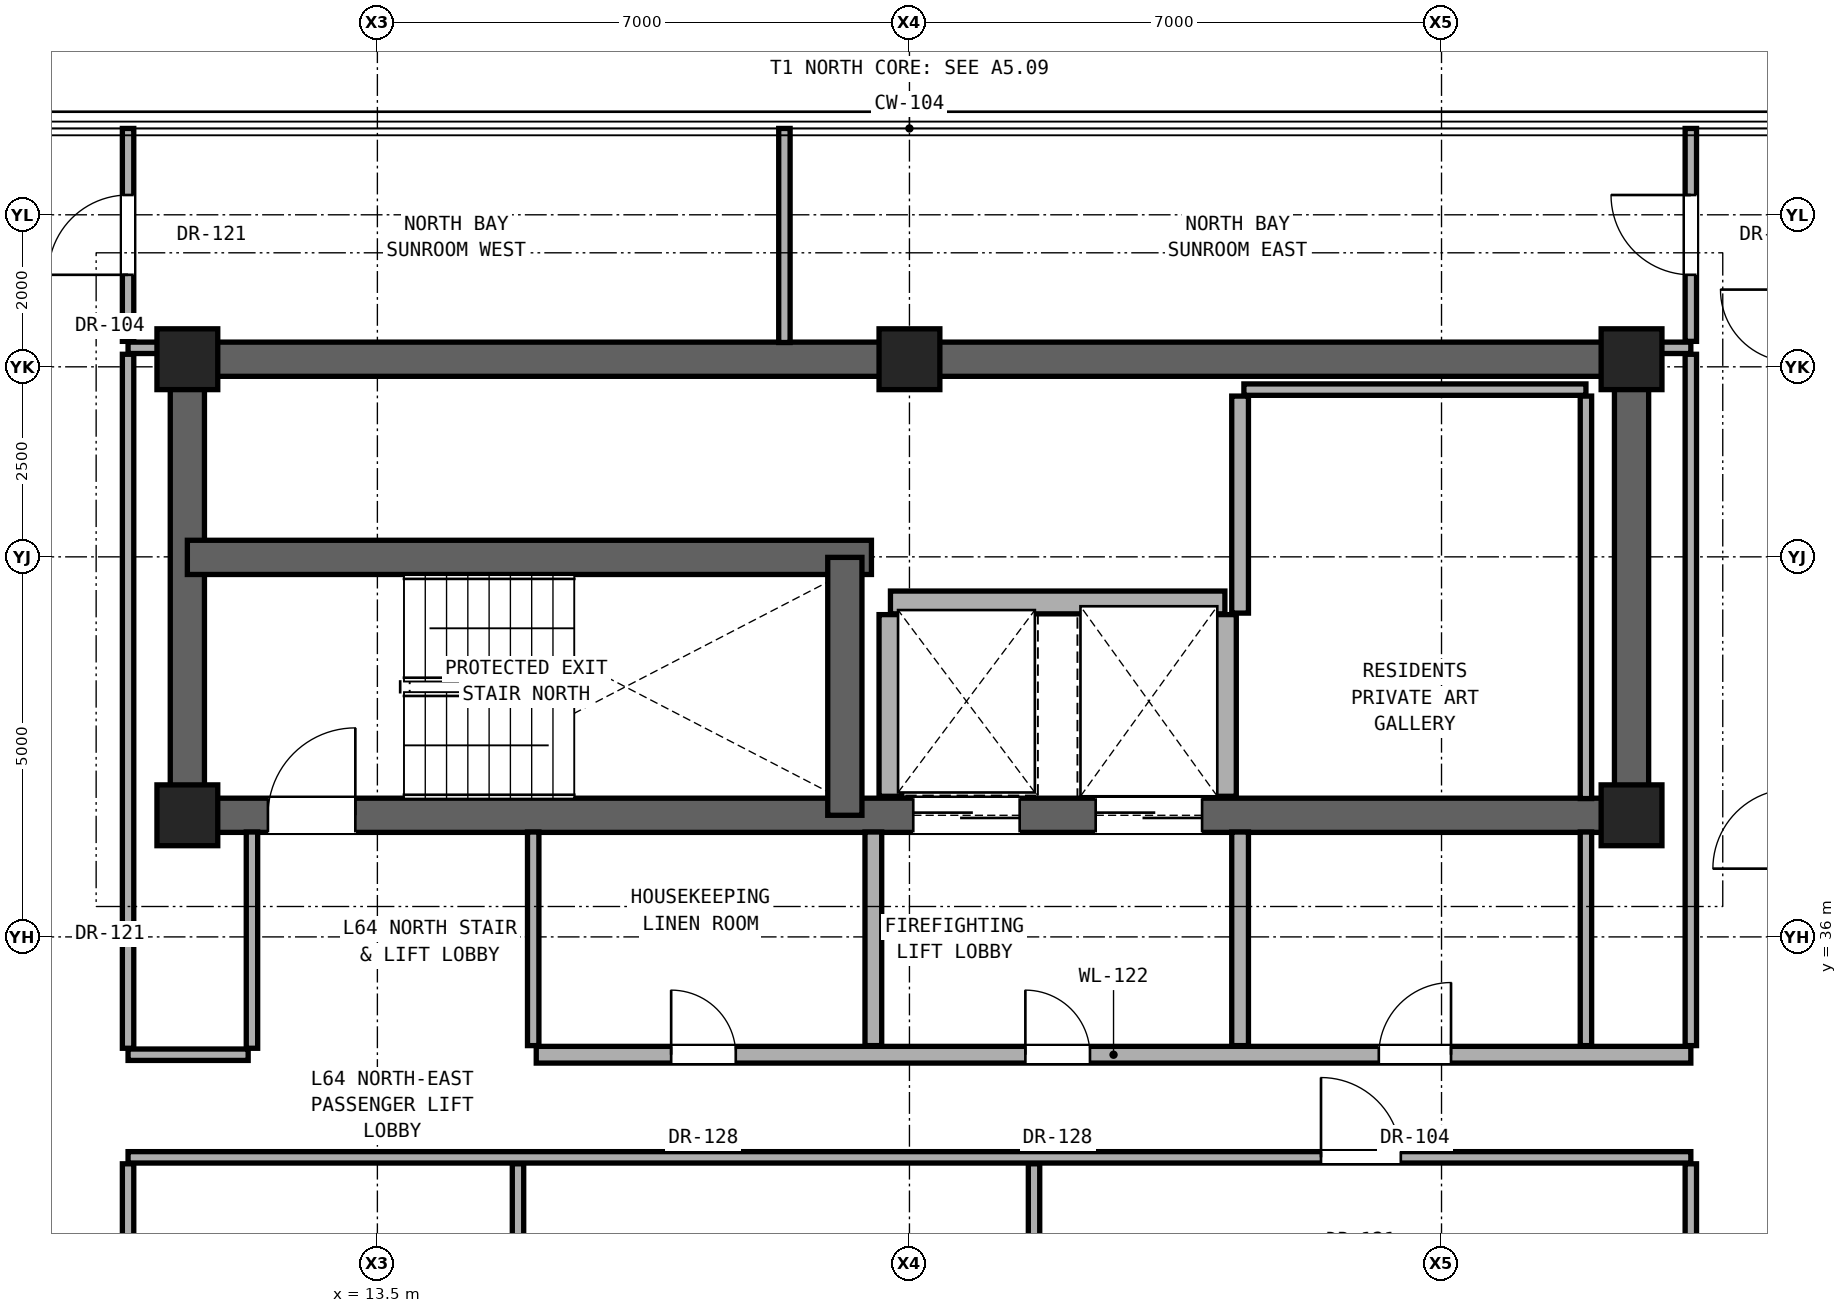
"""IFC4 building model, lengths in metres.
Left out: names, types, materials, properties, quantities, classifications, styles, units other than length and angle.
Written with IfcOpenShell. Run it as: python <this file> out.ifc"""

import sys

from ifc_helpers import new_model, si_unit, direction, frame, frame_2d, origin, origin_2d, place, context, subcontext, project, spatial, rectangle, extrude, element, fill, save


model = new_model("IFC4")
c1 = context("Model", 3, precision=1e-05, world=origin(), true_north=direction((0.0, 1.0)))
c2 = subcontext(c1, "Body", "Model", "MODEL_VIEW")
j1 = project(units=[si_unit("LENGTHUNIT", "METRE"), si_unit("PLANEANGLEUNIT", "RADIAN")], contexts=[c1])
p1 = place(None, origin())
s1 = spatial("IfcSite", under=j1, at=p1, CompositionType="ELEMENT")
p2 = place(p1, origin())
s2 = spatial("IfcBuilding", under=s1, at=p2, CompositionType="ELEMENT")
p3 = place(p2, frame((0.0, 0.0, 226.0)))
s3 = spatial("IfcBuildingStorey", under=s2, at=p3, CompositionType="ELEMENT", Elevation=226.0)
for number, where, z_axis, x_axis in (
    (1, (11.0, 37.6, 0.0), (0.0, 0.0, 1.0), (1.0, 0.0, 0.0)),
    (2, (30.0, 37.6, 0.0), (0.0, 0.0, 1.0), (1.0, 0.0, 0.0)),
    (3, (11.0, 43.6, 0.0), (0.0, 0.0, 1.0), (1.0, 0.0, 0.0)),
    (4, (20.5, 43.6, 0.0), (0.0, 0.0, 1.0), (1.0, 0.0, 0.0)),
    (5, (30.0, 43.6, 0.0), (0.0, 0.0, 1.0), (1.0, 0.0, 0.0)),
):
    element("IfcColumn", number, at=place(p3, frame(where, z_axis=z_axis, x_axis=x_axis)), inside=s3, PredefinedType="COLUMN", context=c2, shape_type="SweptSolid", body=[
        extrude(rectangle(XDim=0.8, YDim=0.8, at=origin_2d()), origin(), (0.0, 0.0, 1.0), 3.3),
    ])
p4 = place(p3, frame((11.0, 43.6, 0.0), z_axis=(0.0, 0.0, 1.0), x_axis=(1.0, 0.0, 0.0)))
e6 = element("IfcWall", 6, at=p4, inside=s3, PredefinedType="SHEAR", context=c2, shape_type="SweptSolid", body=[
    extrude(rectangle(XDim=19.0, YDim=0.45, at=frame_2d((9.5, 0.0))), origin(), (0.0, 0.0, 1.0), 3.1),
])
for number, where, z_axis, x_axis in (
    (7, (11.0, 37.6, 0.0), (0.0, 0.0, 1.0), (0.0, 1.0, 0.0)),
    (8, (30.0, 37.6, 0.0), (0.0, 0.0, 1.0), (0.0, 1.0, 0.0)),
):
    element("IfcWall", number, at=place(p3, frame(where, z_axis=z_axis, x_axis=x_axis)), inside=s3, PredefinedType="SHEAR", context=c2, shape_type="SweptSolid", body=[
        extrude(rectangle(XDim=6.0, YDim=0.45, at=frame_2d((3.0, 0.0))), origin(), (0.0, 0.0, 1.0), 3.1),
    ])
p5 = place(p3, frame((11.0, 37.6, 0.0), z_axis=(0.0, 0.0, 1.0), x_axis=(1.0, 0.0, 0.0)))
e9 = element("IfcWall", 9, at=p5, inside=s3, PredefinedType="SHEAR", context=c2, shape_type="SweptSolid", body=[
    extrude(rectangle(XDim=19.0, YDim=0.45, at=frame_2d((9.5, 0.0))), origin(), (0.0, 0.0, 1.0), 3.1),
])
p6 = place(p5, frame((1.06, 0.0, 0.0)))
e10 = element("IfcOpeningElement", 10, at=p6, cuts=e9, PredefinedType="OPENING", context=c2, shape_type="SweptSolid", body=[
    extrude(rectangle(XDim=1.15, YDim=2.2, at=frame_2d((0.575, 1.1))), frame((0.0, 0.235, 0.0), z_axis=(0.0, -1.0, 0.0), x_axis=(1.0, 0.0, 0.0)), (0.0, 0.0, 1.0), 0.47),
])
p7 = place(p5, frame((9.55, 0.0, 0.0)))
e11 = element("IfcOpeningElement", 11, at=p7, cuts=e9, PredefinedType="OPENING", context=c2, shape_type="SweptSolid", body=[
    extrude(rectangle(XDim=1.4, YDim=2.35, at=frame_2d((0.7, 1.175))), frame((0.0, 0.235, 0.0), z_axis=(0.0, -1.0, 0.0), x_axis=(1.0, 0.0, 0.0)), (0.0, 0.0, 1.0), 0.47),
])
p8 = place(p5, frame((11.95, 0.0, 0.0)))
e12 = element("IfcOpeningElement", 12, at=p8, cuts=e9, PredefinedType="OPENING", context=c2, shape_type="SweptSolid", body=[
    extrude(rectangle(XDim=1.4, YDim=2.35, at=frame_2d((0.7, 1.175))), frame((0.0, 0.235, 0.0), z_axis=(0.0, -1.0, 0.0), x_axis=(1.0, 0.0, 0.0)), (0.0, 0.0, 1.0), 0.47),
])
p9 = place(p3, frame((11.0, 40.993, 0.0), z_axis=(0.0, 0.0, 1.0), x_axis=(1.0, 0.0, 0.0)))
e13 = element("IfcWall", 13, at=p9, inside=s3, PredefinedType="SHEAR", context=c2, shape_type="SweptSolid", body=[
    extrude(rectangle(XDim=9.0, YDim=0.45, at=frame_2d((4.5, 0.0))), origin(), (0.0, 0.0, 1.0), 3.1),
])
p10 = place(p3, frame((19.65, 37.6, 0.0), z_axis=(0.0, 0.0, 1.0), x_axis=(0.0, 1.0, 0.0)))
e14 = element("IfcWall", 14, at=p10, inside=s3, PredefinedType="SHEAR", context=c2, shape_type="SweptSolid", body=[
    extrude(rectangle(XDim=3.393, YDim=0.45, at=frame_2d((1.696, 0.0))), origin(), (0.0, 0.0, 1.0), 3.1),
])
p11 = place(p3, frame((10.22, 33.1, 0.0), z_axis=(0.0, 0.0, 1.0), x_axis=(1.0, 0.0, 0.0)))
e15 = element("IfcWall", 15, at=p11, inside=s3, PredefinedType="PARTITIONING", context=c2, shape_type="SweptSolid", body=[
    extrude(rectangle(XDim=20.56, YDim=0.15, at=frame_2d((10.28, 0.0))), origin(), (0.0, 0.0, 1.0), 2.236),
])
p12 = place(p11, frame((15.695, 0.0, 0.0)))
e16 = element("IfcOpeningElement", 16, at=p12, cuts=e15, PredefinedType="OPENING", context=c2, shape_type="SweptSolid", body=[
    extrude(rectangle(XDim=1.05, YDim=2.2, at=frame_2d((0.525, 1.1))), frame((0.0, 0.085, 0.0), z_axis=(0.0, -1.0, 0.0), x_axis=(1.0, 0.0, 0.0)), (0.0, 0.0, 1.0), 0.17),
])
p13 = place(p3, frame((10.22, 34.45, 0.0), z_axis=(0.0, 0.0, 1.0), x_axis=(1.0, 0.0, 0.0)))
e17 = element("IfcWall", 17, at=p13, inside=s3, PredefinedType="PARTITIONING", context=c2, shape_type="SweptSolid", body=[
    extrude(rectangle(XDim=1.58, YDim=0.15, at=frame_2d((0.79, 0.0))), origin(), (0.0, 0.0, 1.0), 2.236),
])
p14 = place(p3, frame((15.59, 34.45, 0.0), z_axis=(0.0, 0.0, 1.0), x_axis=(1.0, 0.0, 0.0)))
e18 = element("IfcWall", 18, at=p14, inside=s3, PredefinedType="SOLIDWALL", context=c2, shape_type="SweptSolid", body=[
    extrude(rectangle(XDim=15.19, YDim=0.22, at=frame_2d((7.595, 0.0))), origin(), (0.0, 0.0, 1.0), 2.236),
])
p15 = place(p14, frame((6.435, 0.0, 0.0)))
e19 = element("IfcOpeningElement", 19, at=p15, cuts=e18, PredefinedType="OPENING", context=c2, shape_type="SweptSolid", body=[
    extrude(rectangle(XDim=0.85, YDim=2.01, at=frame_2d((0.425, 1.005))), frame((0.0, 0.12, 0.0), z_axis=(0.0, -1.0, 0.0), x_axis=(1.0, 0.0, 0.0)), (0.0, 0.0, 1.0), 0.24),
])
p16 = place(p14, frame((11.085, 0.0, 0.0)))
e20 = element("IfcOpeningElement", 20, at=p16, cuts=e18, PredefinedType="OPENING", context=c2, shape_type="SweptSolid", body=[
    extrude(rectangle(XDim=0.95, YDim=2.15, at=frame_2d((0.475, 1.075))), frame((0.0, 0.12, 0.0), z_axis=(0.0, -1.0, 0.0), x_axis=(1.0, 0.0, 0.0)), (0.0, 0.0, 1.0), 0.24),
])
p17 = place(p14, frame((1.775, 0.0, 0.0)))
e21 = element("IfcOpeningElement", 21, at=p17, cuts=e18, PredefinedType="OPENING", context=c2, shape_type="SweptSolid", body=[
    extrude(rectangle(XDim=0.85, YDim=2.01, at=frame_2d((0.425, 1.005))), frame((0.0, 0.12, 0.0), z_axis=(0.0, -1.0, 0.0), x_axis=(1.0, 0.0, 0.0)), (0.0, 0.0, 1.0), 0.24),
])
p18 = place(p3, frame((20.25, 40.4, 0.0), z_axis=(0.0, 0.0, 1.0), x_axis=(1.0, 0.0, 0.0)))
e22 = element("IfcWall", 22, at=p18, inside=s3, PredefinedType="SOLIDWALL", context=c2, shape_type="SweptSolid", body=[
    extrude(rectangle(XDim=4.4, YDim=0.3, at=frame_2d((2.2, 0.0))), origin(), (0.0, 0.0, 1.0), 3.1),
])
p19 = place(p3, frame((24.9, 43.2, 0.0), z_axis=(0.0, 0.0, 1.0), x_axis=(1.0, 0.0, 0.0)))
e23 = element("IfcWall", 23, at=p19, inside=s3, PredefinedType="PARTITIONING", context=c2, shape_type="SweptSolid", body=[
    extrude(rectangle(XDim=4.5, YDim=0.15, at=frame_2d((2.25, 0.0))), origin(), (0.0, 0.0, 1.0), 3.1),
])
for number, where, z_axis, x_axis in (
    (24, (10.22, 43.75, 0.0), (0.0, 0.0, 1.0), (1.0, 0.0, 0.0)),
    (25, (30.22, 43.75, 0.0), (0.0, 0.0, 1.0), (1.0, 0.0, 0.0)),
):
    element("IfcWall", number, at=place(p3, frame(where, z_axis=z_axis, x_axis=x_axis)), inside=s3, PredefinedType="PARTITIONING", context=c2, shape_type="SweptSolid", body=[
        extrude(rectangle(XDim=0.56, YDim=0.15, at=frame_2d((0.28, 0.0))), origin(), (0.0, 0.0, 1.0), 3.1),
    ])
p20 = place(p3, frame((10.22, 22.935, 0.0), z_axis=(0.0, 0.0, 1.0), x_axis=(0.0, 1.0, 0.0)))
e26 = element("IfcWall", 26, at=p20, inside=s3, PredefinedType="PARTITIONING", context=c2, shape_type="SweptSolid", body=[
    extrude(rectangle(XDim=10.08, YDim=0.15, at=frame_2d((5.04, 0.0))), origin(), (0.0, 0.0, 1.0), 2.396),
])
p21 = place(p20, frame((4.565, 0.0, 0.0)))
e27 = element("IfcOpeningElement", 27, at=p21, cuts=e26, PredefinedType="OPENING", context=c2, shape_type="SweptSolid", body=[
    extrude(rectangle(XDim=0.95, YDim=2.15, at=frame_2d((0.475, 1.075))), frame((0.0, 0.085, 0.0), z_axis=(0.0, -1.0, 0.0), x_axis=(1.0, 0.0, 0.0)), (0.0, 0.0, 1.0), 0.17),
])
p22 = place(p3, frame((10.22, 34.535, 0.0), z_axis=(0.0, 0.0, 1.0), x_axis=(0.0, 1.0, 0.0)))
e28 = element("IfcWall", 28, at=p22, inside=s3, PredefinedType="PARTITIONING", context=c2, shape_type="SweptSolid", body=[
    extrude(rectangle(XDim=9.13, YDim=0.15, at=frame_2d((4.565, 0.0))), origin(), (0.0, 0.0, 1.0), 2.492),
])
p23 = place(p3, frame((10.22, 43.835, 0.0), z_axis=(0.0, 0.0, 1.0), x_axis=(0.0, 1.0, 0.0)))
e29 = element("IfcWall", 29, at=p23, inside=s3, PredefinedType="PARTITIONING", context=c2, shape_type="SweptSolid", body=[
    extrude(rectangle(XDim=2.801, YDim=0.15, at=frame_2d((1.4, 0.0))), origin(), (0.0, 0.0, 1.0), 3.1),
])
p24 = place(p23, frame((0.875, 0.0, 0.0)))
e30 = element("IfcOpeningElement", 30, at=p24, cuts=e29, PredefinedType="OPENING", context=c2, shape_type="SweptSolid", body=[
    extrude(rectangle(XDim=1.05, YDim=2.2, at=frame_2d((0.525, 1.1))), frame((0.0, 0.085, 0.0), z_axis=(0.0, -1.0, 0.0), x_axis=(1.0, 0.0, 0.0)), (0.0, 0.0, 1.0), 0.17),
])
p25 = place(p3, frame((11.85, 34.535, 0.0), z_axis=(0.0, 0.0, 1.0), x_axis=(0.0, 1.0, 0.0)))
e31 = element("IfcWall", 31, at=p25, inside=s3, PredefinedType="PARTITIONING", context=c2, shape_type="SweptSolid", body=[
    extrude(rectangle(XDim=2.845, YDim=0.15, at=frame_2d((1.422, 0.0))), origin(), (0.0, 0.0, 1.0), 3.1),
])
p26 = place(p3, frame((15.35, 22.935, 0.0), z_axis=(0.0, 0.0, 1.0), x_axis=(0.0, 1.0, 0.0)))
e32 = element("IfcWall", 32, at=p26, inside=s3, PredefinedType="PARTITIONING", context=c2, shape_type="SweptSolid", body=[
    extrude(rectangle(XDim=10.08, YDim=0.15, at=frame_2d((5.04, 0.0))), origin(), (0.0, 0.0, 1.0), 2.236),
])
p27 = place(p3, frame((15.55, 34.57, 0.0), z_axis=(0.0, 0.0, 1.0), x_axis=(0.0, 1.0, 0.0)))
e33 = element("IfcWall", 33, at=p27, inside=s3, PredefinedType="PARTITIONING", context=c2, shape_type="SweptSolid", body=[
    extrude(rectangle(XDim=2.81, YDim=0.15, at=frame_2d((1.405, 0.0))), origin(), (0.0, 0.0, 1.0), 3.1),
])
p28 = place(p3, frame((18.855, 43.82, 0.0), z_axis=(0.0, 0.0, 1.0), x_axis=(0.0, 1.0, 0.0)))
e34 = element("IfcWall", 34, at=p28, inside=s3, PredefinedType="PARTITIONING", context=c2, shape_type="SweptSolid", body=[
    extrude(rectangle(XDim=2.816, YDim=0.15, at=frame_2d((1.408, 0.0))), origin(), (0.0, 0.0, 1.0), 3.1),
])
p29 = place(p3, frame((20.025, 34.57, 0.0), z_axis=(0.0, 0.0, 1.0), x_axis=(0.0, 1.0, 0.0)))
e35 = element("IfcWall", 35, at=p29, inside=s3, PredefinedType="SOLIDWALL", context=c2, shape_type="SweptSolid", body=[
    extrude(rectangle(XDim=2.81, YDim=0.22, at=frame_2d((1.405, 0.0))), origin(), (0.0, 0.0, 1.0), 3.1),
])
p30 = place(p3, frame((20.25, 37.85, 0.0), z_axis=(0.0, 0.0, 1.0), x_axis=(0.0, 1.0, 0.0)))
e36 = element("IfcWall", 36, at=p30, inside=s3, PredefinedType="SOLIDWALL", context=c2, shape_type="SweptSolid", body=[
    extrude(rectangle(XDim=2.39, YDim=0.3, at=frame_2d((1.195, 0.0))), origin(), (0.0, 0.0, 1.0), 3.1),
])
p31 = place(p3, frame((22.139, 19.985, 0.0), z_axis=(0.0, 0.0, 1.0), x_axis=(0.0, 1.0, 0.0)))
e37 = element("IfcWall", 37, at=p31, inside=s3, PredefinedType="PARTITIONING", context=c2, shape_type="SweptSolid", body=[
    extrude(rectangle(XDim=13.03, YDim=0.15, at=frame_2d((6.515, 0.0))), origin(), (0.0, 0.0, 1.0), 2.236),
])
p32 = place(p3, frame((24.65, 37.85, 0.0), z_axis=(0.0, 0.0, 1.0), x_axis=(0.0, 1.0, 0.0)))
e38 = element("IfcWall", 38, at=p32, inside=s3, PredefinedType="SOLIDWALL", context=c2, shape_type="SweptSolid", body=[
    extrude(rectangle(XDim=2.39, YDim=0.3, at=frame_2d((1.195, 0.0))), origin(), (0.0, 0.0, 1.0), 3.1),
])
p33 = place(p3, frame((24.85, 34.57, 0.0), z_axis=(0.0, 0.0, 1.0), x_axis=(0.0, 1.0, 0.0)))
e39 = element("IfcWall", 39, at=p33, inside=s3, PredefinedType="SOLIDWALL", context=c2, shape_type="SweptSolid", body=[
    extrude(rectangle(XDim=2.81, YDim=0.22, at=frame_2d((1.405, 0.0))), origin(), (0.0, 0.0, 1.0), 3.1),
])
p34 = place(p3, frame((24.85, 40.26, 0.0), z_axis=(0.0, 0.0, 1.0), x_axis=(0.0, 1.0, 0.0)))
e40 = element("IfcWall", 40, at=p34, inside=s3, PredefinedType="SOLIDWALL", context=c2, shape_type="SweptSolid", body=[
    extrude(rectangle(XDim=2.855, YDim=0.22, at=frame_2d((1.427, 0.0))), origin(), (0.0, 0.0, 1.0), 3.1),
])
p35 = place(p3, frame((29.4, 34.57, 0.0), z_axis=(0.0, 0.0, 1.0), x_axis=(0.0, 1.0, 0.0)))
e41 = element("IfcWall", 41, at=p35, inside=s3, PredefinedType="PARTITIONING", context=c2, shape_type="SweptSolid", body=[
    extrude(rectangle(XDim=2.81, YDim=0.15, at=frame_2d((1.405, 0.0))), origin(), (0.0, 0.0, 1.0), 3.1),
])
p36 = place(p3, frame((29.4, 37.82, 0.0), z_axis=(0.0, 0.0, 1.0), x_axis=(0.0, 1.0, 0.0)))
e42 = element("IfcWall", 42, at=p36, inside=s3, PredefinedType="PARTITIONING", context=c2, shape_type="SweptSolid", body=[
    extrude(rectangle(XDim=5.295, YDim=0.15, at=frame_2d((2.647, 0.0))), origin(), (0.0, 0.0, 1.0), 3.1),
])
p37 = place(p3, frame((30.78, 19.985, 0.0), z_axis=(0.0, 0.0, 1.0), x_axis=(0.0, 1.0, 0.0)))
e43 = element("IfcWall", 43, at=p37, inside=s3, PredefinedType="PARTITIONING", context=c2, shape_type="SweptSolid", body=[
    extrude(rectangle(XDim=13.03, YDim=0.15, at=frame_2d((6.515, 0.0))), origin(), (0.0, 0.0, 1.0), 2.396),
])
p38 = place(p3, frame((30.78, 34.57, 0.0), z_axis=(0.0, 0.0, 1.0), x_axis=(0.0, 1.0, 0.0)))
e44 = element("IfcWall", 44, at=p38, inside=s3, PredefinedType="PARTITIONING", context=c2, shape_type="SweptSolid", body=[
    extrude(rectangle(XDim=9.095, YDim=0.15, at=frame_2d((4.547, 0.0))), origin(), (0.0, 0.0, 1.0), 2.492),
])
p39 = place(p3, frame((30.78, 43.835, 0.0), z_axis=(0.0, 0.0, 1.0), x_axis=(0.0, 1.0, 0.0)))
e45 = element("IfcWall", 45, at=p39, inside=s3, PredefinedType="PARTITIONING", context=c2, shape_type="SweptSolid", body=[
    extrude(rectangle(XDim=2.801, YDim=0.15, at=frame_2d((1.4, 0.0))), origin(), (0.0, 0.0, 1.0), 3.1),
])
p40 = place(p39, frame((0.875, 0.0, 0.0)))
e46 = element("IfcOpeningElement", 46, at=p40, cuts=e45, PredefinedType="OPENING", context=c2, shape_type="SweptSolid", body=[
    extrude(rectangle(XDim=1.05, YDim=2.2, at=frame_2d((0.525, 1.1))), frame((0.0, 0.085, 0.0), z_axis=(0.0, -1.0, 0.0), x_axis=(1.0, 0.0, 0.0)), (0.0, 0.0, 1.0), 0.17),
])
p41 = place(p6, origin())
e47 = element("IfcDoor", 47, at=p41, inside=s3, OperationType="SINGLE_SWING_RIGHT", PredefinedType="DOOR", context=c2, shape_type="SweptSolid", body=[
    extrude(rectangle(XDim=1.15, YDim=2.2, at=frame_2d((0.575, 1.1))), frame((0.0, 0.025, 0.0), z_axis=(0.0, -1.0, 0.0), x_axis=(1.0, 0.0, 0.0)), (0.0, 0.0, 1.0), 0.05),
])
fill(e10, e47)
p42 = place(p15, origin())
e48 = element("IfcDoor", 48, at=p42, inside=s3, OperationType="SINGLE_SWING_LEFT", PredefinedType="DOOR", context=c2, shape_type="SweptSolid", body=[
    extrude(rectangle(XDim=0.85, YDim=2.01, at=frame_2d((0.425, 1.005))), frame((0.0, 0.025, 0.0), z_axis=(0.0, -1.0, 0.0), x_axis=(1.0, 0.0, 0.0)), (0.0, 0.0, 1.0), 0.05),
])
fill(e19, e48)
p43 = place(p16, origin())
e49 = element("IfcDoor", 49, at=p43, inside=s3, OperationType="SINGLE_SWING_RIGHT", PredefinedType="DOOR", context=c2, shape_type="SweptSolid", body=[
    extrude(rectangle(XDim=0.95, YDim=2.15, at=frame_2d((0.475, 1.075))), frame((0.0, 0.025, 0.0), z_axis=(0.0, -1.0, 0.0), x_axis=(1.0, 0.0, 0.0)), (0.0, 0.0, 1.0), 0.05),
])
fill(e20, e49)
p44 = place(p17, origin())
e50 = element("IfcDoor", 50, at=p44, inside=s3, OperationType="SINGLE_SWING_LEFT", PredefinedType="DOOR", context=c2, shape_type="SweptSolid", body=[
    extrude(rectangle(XDim=0.85, YDim=2.01, at=frame_2d((0.425, 1.005))), frame((0.0, 0.025, 0.0), z_axis=(0.0, -1.0, 0.0), x_axis=(1.0, 0.0, 0.0)), (0.0, 0.0, 1.0), 0.05),
])
fill(e21, e50)
p45 = place(p12, origin())
e51 = element("IfcDoor", 51, at=p45, inside=s3, OperationType="SINGLE_SWING_LEFT", PredefinedType="DOOR", context=c2, shape_type="SweptSolid", body=[
    extrude(rectangle(XDim=1.05, YDim=2.2, at=frame_2d((0.525, 1.1))), frame((0.0, 0.025, 0.0), z_axis=(0.0, -1.0, 0.0), x_axis=(1.0, 0.0, 0.0)), (0.0, 0.0, 1.0), 0.05),
])
fill(e16, e51)
p46 = place(p24, origin())
e52 = element("IfcDoor", 52, at=p46, inside=s3, OperationType="SINGLE_SWING_LEFT", PredefinedType="DOOR", context=c2, shape_type="SweptSolid", body=[
    extrude(rectangle(XDim=1.05, YDim=2.2, at=frame_2d((0.525, 1.1))), frame((0.0, 0.025, 0.0), z_axis=(0.0, -1.0, 0.0), x_axis=(1.0, 0.0, 0.0)), (0.0, 0.0, 1.0), 0.05),
])
fill(e30, e52)
p47 = place(p40, origin())
e53 = element("IfcDoor", 53, at=p47, inside=s3, OperationType="SINGLE_SWING_RIGHT", PredefinedType="DOOR", context=c2, shape_type="SweptSolid", body=[
    extrude(rectangle(XDim=1.05, YDim=2.2, at=frame_2d((0.525, 1.1))), frame((0.0, 0.025, 0.0), z_axis=(0.0, -1.0, 0.0), x_axis=(1.0, 0.0, 0.0)), (0.0, 0.0, 1.0), 0.05),
])
fill(e46, e53)
p48 = place(p7, origin())
e54 = element("IfcDoor", 54, at=p48, inside=s3, OperationType="DOUBLE_DOOR_SLIDING", PredefinedType="DOOR", context=c2, shape_type="SweptSolid", body=[
    extrude(rectangle(XDim=1.4, YDim=2.35, at=frame_2d((0.7, 1.175))), frame((0.0, 0.025, 0.0), z_axis=(0.0, -1.0, 0.0), x_axis=(1.0, 0.0, 0.0)), (0.0, 0.0, 1.0), 0.05),
])
fill(e11, e54)
p49 = place(p8, origin())
e55 = element("IfcDoor", 55, at=p49, inside=s3, OperationType="DOUBLE_DOOR_SLIDING", PredefinedType="DOOR", context=c2, shape_type="SweptSolid", body=[
    extrude(rectangle(XDim=1.4, YDim=2.35, at=frame_2d((0.7, 1.175))), frame((0.0, 0.025, 0.0), z_axis=(0.0, -1.0, 0.0), x_axis=(1.0, 0.0, 0.0)), (0.0, 0.0, 1.0), 0.05),
])
fill(e12, e55)
save(model, sys.argv[1])
